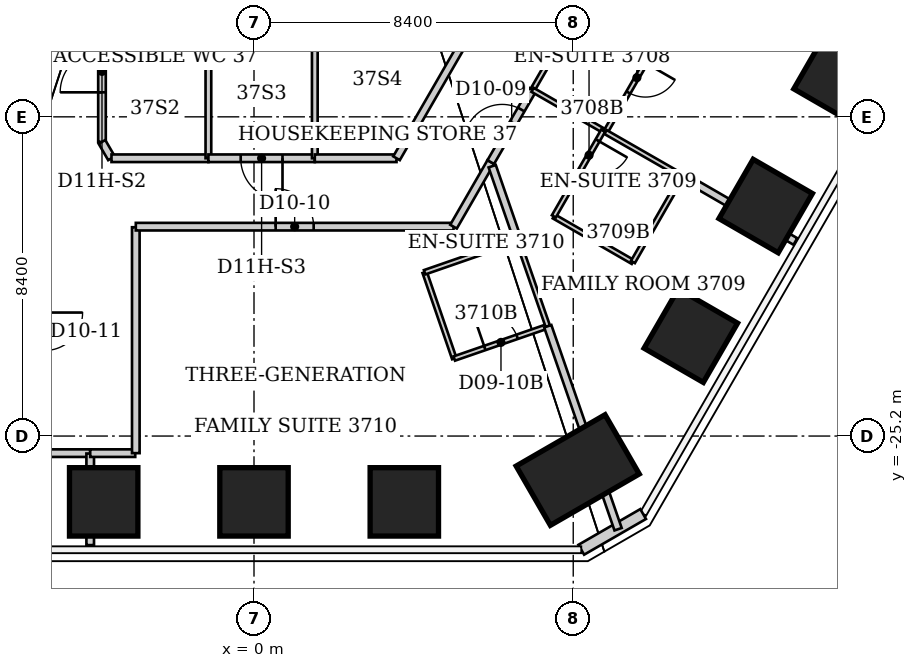
"""IFC4 building model, lengths in metres.
Left out: names, types, materials, properties, quantities, classifications, styles, units other than length and angle.
Written with IfcOpenShell. Run it as: python <this file> out.ifc"""

import sys

from ifc_helpers import new_model, si_unit, direction, frame, frame_2d, origin, origin_2d, place, context, subcontext, project, spatial, rectangle, extrude, element, fill, save


model = new_model("IFC4")
c1 = context("Model", 3, precision=1e-05, world=origin(), true_north=direction((0.0, 1.0)))
c2 = subcontext(c1, "Body", "Model", "MODEL_VIEW")
j1 = project(units=[si_unit("LENGTHUNIT", "METRE"), si_unit("PLANEANGLEUNIT", "RADIAN")], contexts=[c1])
p1 = place(None, origin())
s1 = spatial("IfcSite", under=j1, at=p1, CompositionType="ELEMENT")
p2 = place(p1, origin())
s2 = spatial("IfcBuilding", under=s1, at=p2, CompositionType="ELEMENT")
p3 = place(p2, frame((0.0, 0.0, 150.0)))
s3 = spatial("IfcBuildingStorey", under=s2, at=p3, CompositionType="ELEMENT", Elevation=150.0)
p4 = place(p3, frame((15.434, -15.735, -0.054), z_axis=(-0.034351769062, 0.035047661253, 0.998795082789), x_axis=(0.865183525634, -0.499222020213, 0.047274110313)))
e1 = element("IfcColumn", 1, at=p4, inside=s3, PredefinedType="COLUMN", context=c2, shape_type="SweptSolid", body=[
    extrude(rectangle(XDim=1.8, YDim=1.8, at=origin_2d()), origin(), (0.0, 0.0, 1.0), 3.859),
])
p5 = place(p3, frame((13.464, -19.147, -0.062), z_axis=(-0.029984502764, 0.04260955656, 0.998641755227), x_axis=(0.865747631398, -0.498245094486, 0.047253196188)))
e2 = element("IfcColumn", 2, at=p5, inside=s3, PredefinedType="COLUMN", context=c2, shape_type="SweptSolid", body=[
    extrude(rectangle(XDim=1.8, YDim=1.8, at=origin_2d()), origin(), (0.0, 0.0, 1.0), 3.868),
])
p6 = place(p3, frame((11.494, -22.559, -0.07), z_axis=(-0.025571235621, 0.050197721157, 0.998411889302), x_axis=(0.865745559121, -0.498251437924, 0.047224267791)))
e3 = element("IfcColumn", 3, at=p6, inside=s3, PredefinedType="COLUMN", context=c2, shape_type="SweptSolid", body=[
    extrude(rectangle(XDim=1.8, YDim=1.8, at=origin_2d()), origin(), (0.0, 0.0, 1.0), 3.876),
])
p7 = place(p3, frame((8.518, -26.094, -0.071), z_axis=(-0.019072101806, 0.058475190025, 0.998106661176), x_axis=(0.499546620481, -0.864194486493, 0.060175273)))
e4 = element("IfcColumn", 4, at=p7, inside=s3, PredefinedType="COLUMN", context=c2, shape_type="SweptSolid", body=[
    extrude(rectangle(XDim=1.8, YDim=2.7, at=origin_2d()), origin(), (0.0, 0.0, 1.0), 3.879),
])
p8 = place(p3, frame((3.955, -26.932, -0.061), z_axis=(-0.008710934008, 0.058956611328, 0.998222539121), x_axis=(0.000360575558, -0.998260163932, 0.058961980052)))
e5 = element("IfcColumn", 5, at=p8, inside=s3, PredefinedType="COLUMN", context=c2, shape_type="SweptSolid", body=[
    extrude(rectangle(XDim=1.8, YDim=1.8, at=origin_2d()), origin(), (0.0, 0.0, 1.0), 3.868),
])
p9 = place(p3, frame((0.0, -26.932, -0.053), z_axis=(0.0, 0.05901121961, 0.998257319512), x_axis=(0.0, -0.998257319512, 0.05901121961)))
e6 = element("IfcColumn", 6, at=p9, inside=s3, PredefinedType="COLUMN", context=c2, shape_type="SweptSolid", body=[
    extrude(rectangle(XDim=1.8, YDim=1.8, at=origin_2d()), origin(), (0.0, 0.0, 1.0), 3.86),
])
p10 = place(p3, frame((-3.955, -26.932, -0.061), z_axis=(0.008710934008, 0.058956611328, 0.998222539121), x_axis=(-0.000360575558, -0.998260163932, 0.058961980052)))
e7 = element("IfcColumn", 7, at=p10, inside=s3, PredefinedType="COLUMN", context=c2, shape_type="SweptSolid", body=[
    extrude(rectangle(XDim=1.8, YDim=1.8, at=origin_2d()), origin(), (0.0, 0.0, 1.0), 3.868),
])
p11 = place(p3, frame((10.24, -27.252, 0.0), z_axis=(0.0, 0.0, 1.0), x_axis=(-0.866045024864, -0.499966013754, 0.0)))
e8 = element("IfcWall", 8, at=p11, inside=s3, PredefinedType="SOLIDWALL", context=c2, shape_type="SweptSolid", body=[
    extrude(rectangle(XDim=1.88, YDim=0.3, at=frame_2d((0.94, 0.0))), origin(), (0.0, 0.0, 1.0), 3.64),
])
p12 = place(p3, frame((-5.5, -25.65, 0.0), z_axis=(0.0, 0.0, 1.0), x_axis=(1.0, 0.0, 0.0)))
e9 = element("IfcWall", 9, at=p12, inside=s3, PredefinedType="PARTITIONING", context=c2, shape_type="SweptSolid", body=[
    extrude(rectangle(XDim=1.19, YDim=0.2, at=frame_2d((0.595, 0.0))), origin(), (0.0, 0.0, 1.0), 3.64),
])
p13 = place(p3, frame((-4.31, -28.07, 0.0), z_axis=(0.0, 0.0, 1.0), x_axis=(0.0, 1.0, 0.0)))
e10 = element("IfcWall", 10, at=p13, inside=s3, PredefinedType="PARTITIONING", context=c2, shape_type="SweptSolid", body=[
    extrude(rectangle(XDim=2.41, YDim=0.2, at=frame_2d((1.205, 0.0))), origin(), (0.0, 0.0, 1.0), 3.64),
])
p14 = place(p3, frame((-4.31, -25.65, 0.0), z_axis=(0.0, 0.0, 1.0), x_axis=(1.0, 0.0, 0.0)))
e11 = element("IfcWall", 11, at=p14, inside=s3, PredefinedType="PARTITIONING", context=c2, shape_type="SweptSolid", body=[
    extrude(rectangle(XDim=1.185, YDim=0.2, at=frame_2d((0.593, 0.0))), origin(), (0.0, 0.0, 1.0), 3.64),
])
p15 = place(p3, frame((-4.0, -17.46, 0.0), z_axis=(0.0, 0.0, 1.0), x_axis=(0.0, 1.0, 0.0)))
e12 = element("IfcWall", 12, at=p15, inside=s3, PredefinedType="PARTITIONING", context=c2, shape_type="SweptSolid", body=[
    extrude(rectangle(XDim=3.71, YDim=0.2, at=frame_2d((1.855, 0.0))), origin(), (0.0, 0.0, 1.0), 2.878),
])
p16 = place(p15, frame((1.305, 0.0, 0.0)))
e13 = element("IfcOpeningElement", 13, at=p16, cuts=e12, PredefinedType="OPENING", context=c2, shape_type="SweptSolid", body=[
    extrude(rectangle(XDim=1.1, YDim=2.2, at=frame_2d((0.55, 1.1))), frame((0.0, 0.1, 0.0), z_axis=(0.0, -1.0, 0.0), x_axis=(1.0, 0.0, 0.0)), (0.0, 0.0, 1.0), 0.2),
])
p17 = place(p3, frame((-3.75, -17.89, 0.0), z_axis=(0.0, 0.0, 1.0), x_axis=(-0.502680181512, 0.864472460588, 0.0)))
e14 = element("IfcWall", 14, at=p17, inside=s3, PredefinedType="PARTITIONING", context=c2, shape_type="SweptSolid", body=[
    extrude(rectangle(XDim=0.497, YDim=0.2, at=frame_2d((0.249, 0.0))), origin(), (0.0, 0.0, 1.0), 3.64),
])
p18 = place(p3, frame((-3.11, -25.65, 0.0), z_axis=(0.0, 0.0, 1.0), x_axis=(0.0, 1.0, 0.0)))
e15 = element("IfcWall", 15, at=p18, inside=s3, PredefinedType="PARTITIONING", context=c2, shape_type="SweptSolid", body=[
    extrude(rectangle(XDim=5.945, YDim=0.2, at=frame_2d((2.972, 0.0))), origin(), (0.0, 0.0, 1.0), 3.64),
])
p19 = place(p3, frame((-3.11, -19.69, 0.0), z_axis=(0.0, 0.0, 1.0), x_axis=(1.0, 0.0, 0.0)))
e16 = element("IfcWall", 16, at=p19, inside=s3, PredefinedType="PARTITIONING", context=c2, shape_type="SweptSolid", body=[
    extrude(rectangle(XDim=8.36, YDim=0.2, at=frame_2d((4.18, 0.0))), origin(), (0.0, 0.0, 1.0), 3.64),
])
p20 = place(p19, frame((3.68, 0.0, 0.0)))
e17 = element("IfcOpeningElement", 17, at=p20, cuts=e16, PredefinedType="OPENING", context=c2, shape_type="SweptSolid", body=[
    extrude(rectangle(XDim=1.0, YDim=2.13, at=frame_2d((0.5, 1.065))), frame((0.0, 0.1, 0.0), z_axis=(0.0, -1.0, 0.0), x_axis=(1.0, 0.0, 0.0)), (0.0, 0.0, 1.0), 0.2),
])
p21 = place(p3, frame((-1.2, -17.89, 0.0), z_axis=(0.0, 0.0, 1.0), x_axis=(-1.0, 0.0, 0.0)))
e18 = element("IfcWall", 18, at=p21, inside=s3, PredefinedType="PARTITIONING", context=c2, shape_type="SweptSolid", body=[
    extrude(rectangle(XDim=2.55, YDim=0.2, at=frame_2d((1.275, 0.0))), origin(), (0.0, 0.0, 1.0), 3.64),
])
p22 = place(p3, frame((-1.2, -13.75, 0.0), z_axis=(0.0, 0.0, 1.0), x_axis=(0.0, -1.0, 0.0)))
e19 = element("IfcWall", 19, at=p22, inside=s3, PredefinedType="PARTITIONING", context=c2, shape_type="SweptSolid", body=[
    extrude(rectangle(XDim=4.14, YDim=0.15, at=frame_2d((2.07, 0.0))), origin(), (0.0, 0.0, 1.0), 3.64),
])
p23 = place(p3, frame((1.6, -17.89, 0.0), z_axis=(0.0, 0.0, 1.0), x_axis=(-1.0, 0.0, 0.0)))
e20 = element("IfcWall", 20, at=p23, inside=s3, PredefinedType="PARTITIONING", context=c2, shape_type="SweptSolid", body=[
    extrude(rectangle(XDim=2.8, YDim=0.2, at=frame_2d((1.4, 0.0))), origin(), (0.0, 0.0, 1.0), 3.64),
])
p24 = place(p23, frame((0.85, 0.0, 0.0)))
e21 = element("IfcOpeningElement", 21, at=p24, cuts=e20, PredefinedType="OPENING", context=c2, shape_type="SweptSolid", body=[
    extrude(rectangle(XDim=1.1, YDim=2.2, at=frame_2d((0.55, 1.1))), frame((0.0, 0.1, 0.0), z_axis=(0.0, -1.0, 0.0), x_axis=(1.0, 0.0, 0.0)), (0.0, 0.0, 1.0), 0.2),
])
p25 = place(p3, frame((1.6, -13.8, 0.0), z_axis=(0.0, 0.0, 1.0), x_axis=(0.0, -1.0, 0.0)))
e22 = element("IfcWall", 22, at=p25, inside=s3, PredefinedType="PARTITIONING", context=c2, shape_type="SweptSolid", body=[
    extrude(rectangle(XDim=4.09, YDim=0.15, at=frame_2d((2.045, 0.0))), origin(), (0.0, 0.0, 1.0), 3.64),
])
p26 = place(p3, frame((3.75, -17.89, 0.0), z_axis=(0.0, 0.0, 1.0), x_axis=(-1.0, 0.0, 0.0)))
e23 = element("IfcWall", 23, at=p26, inside=s3, PredefinedType="PARTITIONING", context=c2, shape_type="SweptSolid", body=[
    extrude(rectangle(XDim=2.15, YDim=0.2, at=frame_2d((1.075, 0.0))), origin(), (0.0, 0.0, 1.0), 3.64),
])
p27 = place(p3, frame((4.49, -20.89, 0.0), z_axis=(0.0, 0.0, 1.0), x_axis=(0.324971746724, -0.945723724896, 0.0)))
e24 = element("IfcWall", 24, at=p27, inside=s3, PredefinedType="PARTITIONING", context=c2, shape_type="SweptSolid", body=[
    extrude(rectangle(XDim=2.4, YDim=0.12, at=frame_2d((1.2, 0.0))), origin(), (0.0, 0.0, 1.0), 3.64),
])
p28 = place(p3, frame((5.25, -19.69, 0.0), z_axis=(0.0, 0.0, 1.0), x_axis=(0.499431599995, 0.866353321068, 0.0)))
e25 = element("IfcWall", 25, at=p28, inside=s3, PredefinedType="PARTITIONING", context=c2, shape_type="SweptSolid", body=[
    extrude(rectangle(XDim=1.962, YDim=0.2, at=frame_2d((0.981, 0.0))), origin(), (0.0, 0.0, 1.0), 3.64),
])
p29 = place(p3, frame((5.27, -23.16, 0.0), z_axis=(0.0, 0.0, 1.0), x_axis=(0.945184415197, 0.326537013627, 0.0)))
e26 = element("IfcWall", 26, at=p29, inside=s3, PredefinedType="PARTITIONING", context=c2, shape_type="SweptSolid", body=[
    extrude(rectangle(XDim=2.603, YDim=0.12, at=frame_2d((1.301, 0.0))), origin(), (0.0, 0.0, 1.0), 3.64),
])
p30 = place(p29, frame((0.85, 0.0, 0.0)))
e27 = element("IfcOpeningElement", 27, at=p30, cuts=e26, PredefinedType="OPENING", context=c2, shape_type="SweptSolid", body=[
    extrude(rectangle(XDim=0.9, YDim=2.03, at=frame_2d((0.45, 1.015))), frame((0.0, 0.06, 0.0), z_axis=(0.0, -1.0, 0.0), x_axis=(1.0, 0.0, 0.0)), (0.0, 0.0, 1.0), 0.12),
])
p31 = place(p3, frame((6.083, -13.85, 0.0), z_axis=(0.0, 0.0, 1.0), x_axis=(-0.499977643516, -0.866038310922, 0.0)))
e28 = element("IfcWall", 28, at=p31, inside=s3, PredefinedType="PARTITIONING", context=c2, shape_type="SweptSolid", body=[
    extrude(rectangle(XDim=4.665, YDim=0.2, at=frame_2d((2.333, 0.0))), origin(), (0.0, 0.0, 1.0), 3.64),
])
p32 = place(p3, frame((6.23, -17.99, 0.0), z_axis=(0.0, 0.0, 1.0), x_axis=(0.501088872721, 0.865395829453, 0.0)))
e29 = element("IfcWall", 29, at=p32, inside=s3, PredefinedType="PARTITIONING", context=c2, shape_type="SweptSolid", body=[
    extrude(rectangle(XDim=2.195, YDim=0.2, at=frame_2d((1.098, 0.0))), origin(), (0.0, 0.0, 1.0), 3.64),
])
p33 = place(p32, frame((0.598, 0.0, 0.0)))
e30 = element("IfcOpeningElement", 30, at=p33, cuts=e29, PredefinedType="OPENING", context=c2, shape_type="SweptSolid", body=[
    extrude(rectangle(XDim=1.0, YDim=2.13, at=frame_2d((0.5, 1.065))), frame((0.0, 0.1, 0.0), z_axis=(0.0, -1.0, 0.0), x_axis=(1.0, 0.0, 0.0)), (0.0, 0.0, 1.0), 0.2),
])
p34 = place(p3, frame((6.268, -18.099, 0.0), z_axis=(0.0, 0.0, 1.0), x_axis=(0.327257488288, -0.944935202202, 0.0)))
e31 = element("IfcWall", 31, at=p34, inside=s3, PredefinedType="PARTITIONING", context=c2, shape_type="SweptSolid", body=[
    extrude(rectangle(XDim=2.054, YDim=0.2, at=frame_2d((1.027, 0.0))), origin(), (0.0, 0.0, 1.0), 3.64),
])
p35 = place(p3, frame((6.94, -20.04, 0.0), z_axis=(0.0, 0.0, 1.0), x_axis=(-0.944772080486, -0.327728112822, 0.0)))
e32 = element("IfcWall", 32, at=p35, inside=s3, PredefinedType="PARTITIONING", context=c2, shape_type="SweptSolid", body=[
    extrude(rectangle(XDim=2.593, YDim=0.12, at=frame_2d((1.297, 0.0))), origin(), (0.0, 0.0, 1.0), 3.64),
])
p36 = place(p3, frame((6.94, -20.04, 0.0), z_axis=(0.0, 0.0, 1.0), x_axis=(0.328693963496, -0.944436487203, 0.0)))
e33 = element("IfcWall", 33, at=p36, inside=s3, PredefinedType="PARTITIONING", context=c2, shape_type="SweptSolid", body=[
    extrude(rectangle(XDim=2.404, YDim=0.12, at=frame_2d((1.202, 0.0))), origin(), (0.0, 0.0, 1.0), 3.64),
])
p37 = place(p3, frame((7.33, -16.09, 0.0), z_axis=(0.0, 0.0, 1.0), x_axis=(0.500786797394, 0.865570669302, 0.0)))
e34 = element("IfcWall", 34, at=p37, inside=s3, PredefinedType="PARTITIONING", context=c2, shape_type="SweptSolid", body=[
    extrude(rectangle(XDim=2.276, YDim=0.12, at=frame_2d((1.138, 0.0))), origin(), (0.0, 0.0, 1.0), 3.64),
])
p38 = place(p3, frame((7.33, -16.09, 0.0), z_axis=(0.0, 0.0, 1.0), x_axis=(0.866825160608, -0.498612214989, 0.0)))
e35 = element("IfcWall", 35, at=p38, inside=s3, PredefinedType="PARTITIONING", context=c2, shape_type="SweptSolid", body=[
    extrude(rectangle(XDim=2.146, YDim=0.12, at=frame_2d((1.073, 0.0))), origin(), (0.0, 0.0, 1.0), 3.64),
])
p39 = place(p3, frame((7.73, -22.31, 0.0), z_axis=(0.0, 0.0, 1.0), x_axis=(0.327284111977, -0.944925981253, 0.0)))
e36 = element("IfcWall", 36, at=p39, inside=s3, PredefinedType="PARTITIONING", context=c2, shape_type="SweptSolid", body=[
    extrude(rectangle(XDim=5.653, YDim=0.2, at=frame_2d((2.826, 0.0))), origin(), (0.0, 0.0, 1.0), 3.64),
])
p40 = place(p3, frame((7.89, -19.42, 0.0), z_axis=(0.0, 0.0, 1.0), x_axis=(0.866202511239, -0.499693115345, 0.0)))
e37 = element("IfcWall", 37, at=p40, inside=s3, PredefinedType="PARTITIONING", context=c2, shape_type="SweptSolid", body=[
    extrude(rectangle(XDim=2.401, YDim=0.12, at=frame_2d((1.201, 0.0))), origin(), (0.0, 0.0, 1.0), 3.64),
])
p41 = place(p3, frame((9.19, -17.16, 0.0), z_axis=(0.0, 0.0, 1.0), x_axis=(-0.498627694264, -0.866816256489, 0.0)))
e38 = element("IfcWall", 38, at=p41, inside=s3, PredefinedType="PARTITIONING", context=c2, shape_type="SweptSolid", body=[
    extrude(rectangle(XDim=2.607, YDim=0.12, at=frame_2d((1.304, 0.0))), origin(), (0.0, 0.0, 1.0), 3.64),
])
p42 = place(p41, frame((0.3, 0.0, 0.0)))
e39 = element("IfcOpeningElement", 39, at=p42, cuts=e38, PredefinedType="OPENING", context=c2, shape_type="SweptSolid", body=[
    extrude(rectangle(XDim=0.9, YDim=2.03, at=frame_2d((0.45, 1.015))), frame((0.0, 0.06, 0.0), z_axis=(0.0, -1.0, 0.0), x_axis=(1.0, 0.0, 0.0)), (0.0, 0.0, 1.0), 0.12),
])
p43 = place(p3, frame((9.25, -17.2, 0.0), z_axis=(0.0, 0.0, 1.0), x_axis=(0.499737123639, 0.866177122335, 0.0)))
e40 = element("IfcWall", 40, at=p43, inside=s3, PredefinedType="PARTITIONING", context=c2, shape_type="SweptSolid", body=[
    extrude(rectangle(XDim=2.401, YDim=0.12, at=frame_2d((1.201, 0.0))), origin(), (0.0, 0.0, 1.0), 3.64),
])
p44 = place(p43, frame((1.201, 0.0, 0.0)))
e41 = element("IfcOpeningElement", 41, at=p44, cuts=e40, PredefinedType="OPENING", context=c2, shape_type="SweptSolid", body=[
    extrude(rectangle(XDim=0.9, YDim=2.03, at=frame_2d((0.45, 1.015))), frame((0.0, 0.06, 0.0), z_axis=(0.0, -1.0, 0.0), x_axis=(1.0, 0.0, 0.0)), (0.0, 0.0, 1.0), 0.12),
])
p45 = place(p3, frame((9.25, -17.2, 0.0), z_axis=(0.0, 0.0, 1.0), x_axis=(0.867157547908, -0.498033921641, 0.0)))
e42 = element("IfcWall", 42, at=p45, inside=s3, PredefinedType="PARTITIONING", context=c2, shape_type="SweptSolid", body=[
    extrude(rectangle(XDim=2.33, YDim=0.12, at=frame_2d((1.165, 0.0))), origin(), (0.0, 0.0, 1.0), 3.64),
])
p46 = place(p3, frame((9.97, -20.62, 0.0), z_axis=(0.0, 0.0, 1.0), x_axis=(0.498627694264, 0.866816256489, 0.0)))
e43 = element("IfcWall", 43, at=p46, inside=s3, PredefinedType="PARTITIONING", context=c2, shape_type="SweptSolid", body=[
    extrude(rectangle(XDim=2.607, YDim=0.12, at=frame_2d((1.304, 0.0))), origin(), (0.0, 0.0, 1.0), 3.64),
])
p47 = place(p3, frame((10.45, -15.12, 0.0), z_axis=(0.0, 0.0, 1.0), x_axis=(-0.865705017107, 0.500554515868, 0.0)))
e44 = element("IfcWall", 44, at=p47, inside=s3, PredefinedType="PARTITIONING", context=c2, shape_type="SweptSolid", body=[
    extrude(rectangle(XDim=2.218, YDim=0.12, at=frame_2d((1.109, 0.0))), origin(), (0.0, 0.0, 1.0), 3.023),
])
p48 = place(p3, frame((11.27, -18.36, 0.0), z_axis=(0.0, 0.0, 1.0), x_axis=(0.865806952829, -0.500378177414, 0.0)))
e45 = element("IfcWall", 45, at=p48, inside=s3, PredefinedType="PARTITIONING", context=c2, shape_type="SweptSolid", body=[
    extrude(rectangle(XDim=3.437, YDim=0.2, at=frame_2d((1.719, 0.0))), origin(), (0.0, 0.0, 1.0), 3.64),
])
p49 = place(p44, origin())
e46 = element("IfcDoor", 46, at=p49, inside=s3, OperationType="SINGLE_SWING_RIGHT", PredefinedType="DOOR", context=c2, shape_type="SweptSolid", body=[
    extrude(rectangle(XDim=0.9, YDim=2.03, at=frame_2d((0.45, 1.015))), frame((0.0, 0.025, 0.0), z_axis=(0.0, -1.0, 0.0), x_axis=(1.0, 0.0, 0.0)), (0.0, 0.0, 1.0), 0.05),
])
fill(e41, e46)
p50 = place(p33, origin())
e47 = element("IfcDoor", 47, at=p50, inside=s3, OperationType="SINGLE_SWING_LEFT", PredefinedType="DOOR", context=c2, shape_type="SweptSolid", body=[
    extrude(rectangle(XDim=1.0, YDim=2.13, at=frame_2d((0.5, 1.065))), frame((0.0, 0.025, 0.0), z_axis=(0.0, -1.0, 0.0), x_axis=(1.0, 0.0, 0.0)), (0.0, 0.0, 1.0), 0.05),
])
fill(e30, e47)
p51 = place(p42, origin())
e48 = element("IfcDoor", 48, at=p51, inside=s3, OperationType="SINGLE_SWING_LEFT", PredefinedType="DOOR", context=c2, shape_type="SweptSolid", body=[
    extrude(rectangle(XDim=0.9, YDim=2.03, at=frame_2d((0.45, 1.015))), frame((0.0, 0.025, 0.0), z_axis=(0.0, -1.0, 0.0), x_axis=(1.0, 0.0, 0.0)), (0.0, 0.0, 1.0), 0.05),
])
fill(e39, e48)
p52 = place(p20, origin())
e49 = element("IfcDoor", 49, at=p52, inside=s3, OperationType="SINGLE_SWING_LEFT", PredefinedType="DOOR", context=c2, shape_type="SweptSolid", body=[
    extrude(rectangle(XDim=1.0, YDim=2.13, at=frame_2d((0.5, 1.065))), frame((0.0, 0.025, 0.0), z_axis=(0.0, -1.0, 0.0), x_axis=(1.0, 0.0, 0.0)), (0.0, 0.0, 1.0), 0.05),
])
fill(e17, e49)
p53 = place(p30, origin())
e50 = element("IfcDoor", 50, at=p53, inside=s3, OperationType="SINGLE_SWING_LEFT", PredefinedType="DOOR", context=c2, shape_type="SweptSolid", body=[
    extrude(rectangle(XDim=0.9, YDim=2.03, at=frame_2d((0.45, 1.015))), frame((0.0, 0.025, 0.0), z_axis=(0.0, -1.0, 0.0), x_axis=(1.0, 0.0, 0.0)), (0.0, 0.0, 1.0), 0.05),
])
fill(e27, e50)
p54 = place(p16, origin())
e51 = element("IfcDoor", 51, at=p54, inside=s3, OperationType="SINGLE_SWING_LEFT", PredefinedType="DOOR", context=c2, shape_type="SweptSolid", body=[
    extrude(rectangle(XDim=1.1, YDim=2.2, at=frame_2d((0.55, 1.1))), frame((0.0, 0.025, 0.0), z_axis=(0.0, -1.0, 0.0), x_axis=(1.0, 0.0, 0.0)), (0.0, 0.0, 1.0), 0.05),
])
fill(e13, e51)
p55 = place(p24, origin())
e52 = element("IfcDoor", 52, at=p55, inside=s3, OperationType="SINGLE_SWING_LEFT", PredefinedType="DOOR", context=c2, shape_type="SweptSolid", body=[
    extrude(rectangle(XDim=1.1, YDim=2.2, at=frame_2d((0.55, 1.1))), frame((0.0, 0.025, 0.0), z_axis=(0.0, -1.0, 0.0), x_axis=(1.0, 0.0, 0.0)), (0.0, 0.0, 1.0), 0.05),
])
fill(e21, e52)
save(model, sys.argv[1])
